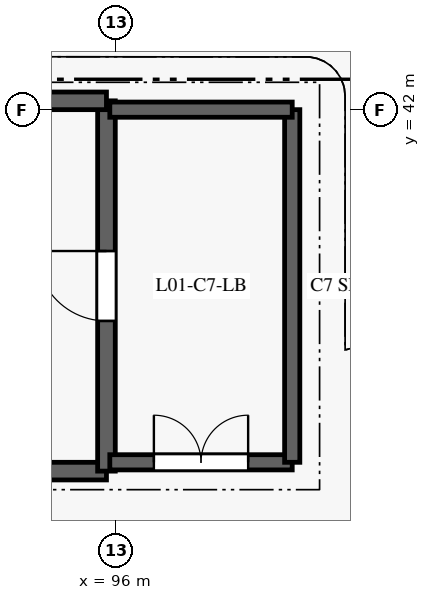
"""IFC4 building model, lengths in metres.
Left out: names, types, materials, properties, quantities, classifications, styles, units other than length and angle.
Written with IfcOpenShell. Run it as: python <this file> out.ifc"""

import sys

from ifc_helpers import new_model, si_unit, direction, frame, frame_2d, origin, place, context, subcontext, project, spatial, rectangle, extrude, element, fill, save


model = new_model("IFC4")
c1 = context("Model", 3, precision=1e-05, world=origin(), true_north=direction((0.0, 1.0)))
c2 = subcontext(c1, "Body", "Model", "MODEL_VIEW")
j1 = project(units=[si_unit("LENGTHUNIT", "METRE"), si_unit("PLANEANGLEUNIT", "RADIAN")], contexts=[c1])
p1 = place(None, origin())
s1 = spatial("IfcSite", under=j1, at=p1, CompositionType="ELEMENT")
p2 = place(p1, origin())
s2 = spatial("IfcBuilding", under=s1, at=p2, CompositionType="ELEMENT")
p3 = place(p2, frame((0.0, 0.0, 4.2)))
s3 = spatial("IfcBuildingStorey", under=s2, at=p3, CompositionType="ELEMENT", Elevation=4.2)
p4 = place(p3, frame((89.055, 36.055, 0.0), z_axis=(0.0, 0.0, 1.0), x_axis=(1.0, 0.0, 0.0)))
e1 = element("IfcWall", 1, at=p4, inside=s3, PredefinedType="SHEAR", context=c2, shape_type="SweptSolid", body=[
    extrude(rectangle(XDim=6.79, YDim=0.29, at=frame_2d((3.395, 0.0))), origin(), (0.0, 0.0, 1.0), 3.95),
])
p5 = place(p3, frame((95.845, 36.055, 0.0), z_axis=(0.0, 0.0, 1.0), x_axis=(0.0, 1.0, 0.0)))
e2 = element("IfcWall", 2, at=p5, inside=s3, PredefinedType="SHEAR", context=c2, shape_type="SweptSolid", body=[
    extrude(rectangle(XDim=6.09, YDim=0.29, at=frame_2d((3.045, 0.0))), origin(), (0.0, 0.0, 1.0), 3.95),
])
p6 = place(p5, frame((2.47, 0.0, 0.0)))
e3 = element("IfcOpeningElement", 3, at=p6, cuts=e2, PredefinedType="OPENING", context=c2, shape_type="SweptSolid", body=[
    extrude(rectangle(XDim=1.15, YDim=2.1, at=frame_2d((0.575, 1.05))), frame((0.0, 0.155, 0.0), z_axis=(0.0, -1.0, 0.0), x_axis=(1.0, 0.0, 0.0)), (0.0, 0.0, 1.0), 0.31),
])
p7 = place(p3, frame((95.845, 42.145, 0.0), z_axis=(0.0, 0.0, 1.0), x_axis=(-1.0, 0.0, 0.0)))
e4 = element("IfcWall", 4, at=p7, inside=s3, PredefinedType="SHEAR", context=c2, shape_type="SweptSolid", body=[
    extrude(rectangle(XDim=6.79, YDim=0.29, at=frame_2d((3.395, 0.0))), origin(), (0.0, 0.0, 1.0), 3.95),
])
p8 = place(p3, frame((95.9, 36.2, 0.0), z_axis=(0.0, 0.0, 1.0), x_axis=(1.0, 0.0, 0.0)))
e5 = element("IfcWall", 5, at=p8, inside=s3, PredefinedType="SHEAR", context=c2, shape_type="SweptSolid", body=[
    extrude(rectangle(XDim=3.0, YDim=0.25, at=frame_2d((1.5, 0.0))), origin(), (0.0, 0.0, 1.0), 3.95),
])
p9 = place(p8, frame((0.725, 0.0, 0.0)))
e6 = element("IfcOpeningElement", 6, at=p9, cuts=e5, PredefinedType="OPENING", context=c2, shape_type="SweptSolid", body=[
    extrude(rectangle(XDim=1.55, YDim=2.15, at=frame_2d((0.775, 1.075))), frame((0.0, 0.135, 0.0), z_axis=(0.0, -1.0, 0.0), x_axis=(1.0, 0.0, 0.0)), (0.0, 0.0, 1.0), 0.27),
])
p10 = place(p3, frame((98.9, 36.2, 0.0), z_axis=(0.0, 0.0, 1.0), x_axis=(0.0, 1.0, 0.0)))
e7 = element("IfcWall", 7, at=p10, inside=s3, PredefinedType="SHEAR", context=c2, shape_type="SweptSolid", body=[
    extrude(rectangle(XDim=5.8, YDim=0.25, at=frame_2d((2.9, 0.0))), origin(), (0.0, 0.0, 1.0), 3.95),
])
p11 = place(p3, frame((98.9, 42.0, 0.0), z_axis=(0.0, 0.0, 1.0), x_axis=(-1.0, 0.0, 0.0)))
e8 = element("IfcWall", 8, at=p11, inside=s3, PredefinedType="SHEAR", context=c2, shape_type="SweptSolid", body=[
    extrude(rectangle(XDim=3.0, YDim=0.25, at=frame_2d((1.5, 0.0))), origin(), (0.0, 0.0, 1.0), 3.95),
])
p12 = place(p6, origin())
e9 = element("IfcDoor", 9, at=p12, inside=s3, OperationType="SINGLE_SWING_RIGHT", PredefinedType="DOOR", context=c2, shape_type="SweptSolid", body=[
    extrude(rectangle(XDim=1.15, YDim=2.1, at=frame_2d((0.575, 1.05))), frame((0.0, 0.025, 0.0), z_axis=(0.0, -1.0, 0.0), x_axis=(1.0, 0.0, 0.0)), (0.0, 0.0, 1.0), 0.05),
])
fill(e3, e9)
p13 = place(p9, origin())
e10 = element("IfcDoor", 10, at=p13, inside=s3, OperationType="DOUBLE_DOOR_SINGLE_SWING", PredefinedType="DOOR", context=c2, shape_type="SweptSolid", body=[
    extrude(rectangle(XDim=1.55, YDim=2.15, at=frame_2d((0.775, 1.075))), frame((0.0, 0.025, 0.0), z_axis=(0.0, -1.0, 0.0), x_axis=(1.0, 0.0, 0.0)), (0.0, 0.0, 1.0), 0.05),
])
fill(e6, e10)
save(model, sys.argv[1])
